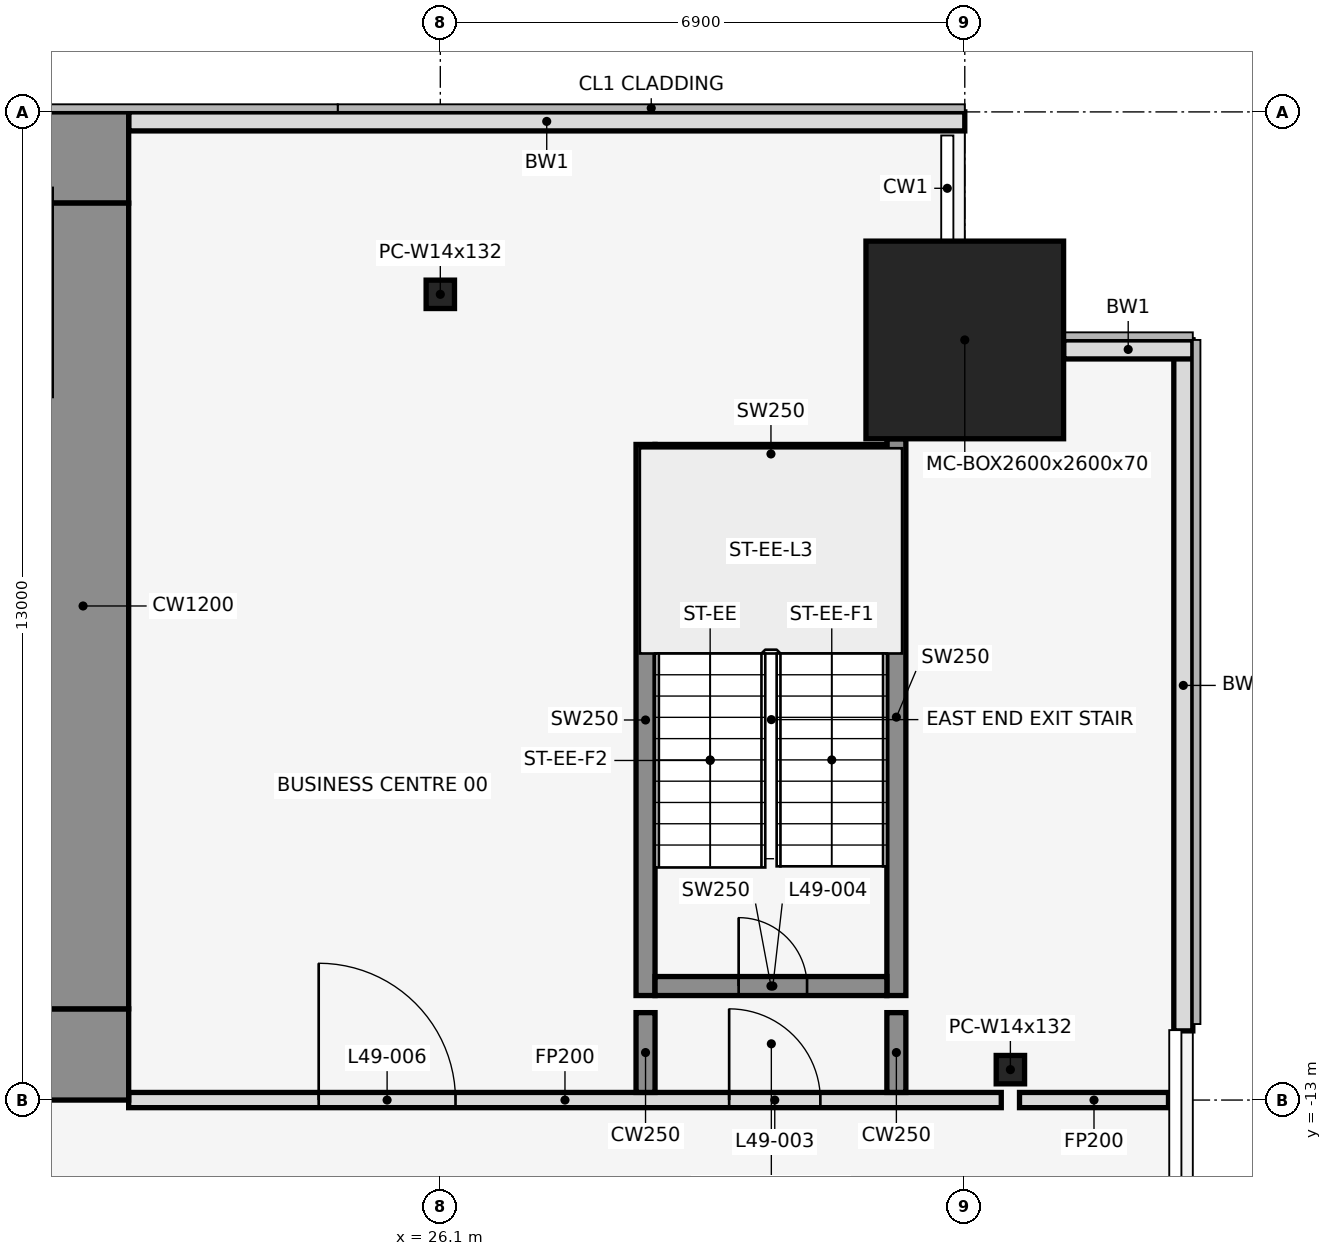
"""IFC4 building model, lengths in metres.
Left out: names, types, materials, properties, quantities, classifications, styles, units other than length and angle.
Written with IfcOpenShell. Run it as: python <this file> out.ifc"""

import sys

from ifc_helpers import new_model, si_unit, direction, frame, frame_2d, origin, origin_2d, place, context, subcontext, project, spatial, rectangle, hollow_rectangle, i_section, extrude, element, fill, save


model = new_model("IFC4")
c1 = context("Model", 3, precision=1e-05, world=origin(), true_north=direction((0.0, 1.0)))
c2 = subcontext(c1, "Body", "Model", "MODEL_VIEW")
j1 = project(units=[si_unit("LENGTHUNIT", "METRE"), si_unit("PLANEANGLEUNIT", "RADIAN")], contexts=[c1])
p1 = place(None, origin())
s1 = spatial("IfcSite", under=j1, at=p1, CompositionType="ELEMENT")
p2 = place(p1, origin())
s2 = spatial("IfcBuilding", under=s1, at=p2, CompositionType="ELEMENT")
p3 = place(p2, frame((0.0, 0.0, 219.6)))
s3 = spatial("IfcBuildingStorey", under=s2, at=p3, CompositionType="ELEMENT", Elevation=219.6)
p4 = place(p3, frame((26.1, -2.4, 0.0), z_axis=(0.0, 0.0, 1.0), x_axis=(1.0, 0.0, 0.0)))
e1 = element("IfcColumn", 1, at=p4, inside=s3, PredefinedType="COLUMN", context=c2, shape_type="SweptSolid", body=[
    extrude(i_section(OverallWidth=0.373, OverallDepth=0.373, WebThickness=0.016, FlangeThickness=0.026, at=origin_2d()), origin(), (0.0, 0.0, 1.0), 4.1),
])
p5 = place(p3, frame((33.0, -3.0, 0.0), z_axis=(0.0, 0.0, 1.0), x_axis=(1.0, 0.0, 0.0)))
e2 = element("IfcColumn", 2, at=p5, inside=s3, PredefinedType="COLUMN", context=c2, shape_type="SweptSolid", body=[
    extrude(hollow_rectangle(XDim=2.6, YDim=2.6, WallThickness=0.07, at=origin_2d()), origin(), (0.0, 0.0, 1.0), 4.1),
])
p6 = place(p3, frame((33.6, -12.6, 0.0), z_axis=(0.0, 0.0, 1.0), x_axis=(1.0, 0.0, 0.0)))
e3 = element("IfcColumn", 3, at=p6, inside=s3, PredefinedType="COLUMN", context=c2, shape_type="SweptSolid", body=[
    extrude(i_section(OverallWidth=0.373, OverallDepth=0.373, WebThickness=0.016, FlangeThickness=0.026, at=origin_2d()), origin(), (0.0, 0.0, 1.0), 4.1),
])
p7 = place(p3, frame((33.0, -0.125, 0.0), z_axis=(0.0, 0.0, 1.0), x_axis=(-1.0, 0.0, 0.0)))
e4 = element("IfcWall", 4, at=p7, inside=s3, PredefinedType="STANDARD", context=c2, shape_type="SweptSolid", body=[
    extrude(rectangle(XDim=11.0, YDim=0.25, at=frame_2d((5.5, 0.0))), origin(), (0.0, 0.0, 1.0), 3.95),
])
p8 = place(p3, frame((35.875, -12.09, 0.0), z_axis=(0.0, 0.0, 1.0), x_axis=(0.0, 1.0, 0.0)))
e5 = element("IfcWall", 5, at=p8, inside=s3, PredefinedType="STANDARD", context=c2, shape_type="SweptSolid", body=[
    extrude(rectangle(XDim=9.09, YDim=0.25, at=frame_2d((4.545, 0.0))), origin(), (0.0, 0.0, 1.0), 3.95),
])
p9 = place(p3, frame((36.0, -3.125, 0.0), z_axis=(0.0, 0.0, 1.0), x_axis=(-1.0, 0.0, 0.0)))
e6 = element("IfcWall", 6, at=p9, inside=s3, PredefinedType="STANDARD", context=c2, shape_type="SweptSolid", body=[
    extrude(rectangle(XDim=1.7, YDim=0.25, at=frame_2d((0.85, 0.0))), origin(), (0.0, 0.0, 1.0), 3.95),
])
p10 = place(p3, frame((28.8, -11.625, 0.0), z_axis=(0.0, 0.0, 1.0), x_axis=(0.0, 1.0, 0.0)))
e7 = element("IfcWall", 7, at=p10, inside=s3, PredefinedType="SHEAR", context=c2, shape_type="SweptSolid", body=[
    extrude(rectangle(XDim=7.25, YDim=0.25, at=frame_2d((3.625, 0.0))), origin(), (0.0, 0.0, 1.0), 4.1),
])
p11 = place(p3, frame((32.1, -11.625, 0.0), z_axis=(0.0, 0.0, 1.0), x_axis=(0.0, 1.0, 0.0)))
e8 = element("IfcWall", 8, at=p11, inside=s3, PredefinedType="SHEAR", context=c2, shape_type="SweptSolid", body=[
    extrude(rectangle(XDim=7.325, YDim=0.25, at=frame_2d((3.663, 0.0))), origin(), (0.0, 0.0, 1.0), 4.1),
])
p12 = place(p3, frame((28.925, -11.5, 0.0), z_axis=(0.0, 0.0, 1.0), x_axis=(1.0, 0.0, 0.0)))
e9 = element("IfcWall", 9, at=p12, inside=s3, PredefinedType="SHEAR", context=c2, shape_type="SweptSolid", body=[
    extrude(rectangle(XDim=3.05, YDim=0.25, at=frame_2d((1.525, 0.0))), origin(), (0.0, 0.0, 1.0), 4.1),
])
p13 = place(p12, frame((1.1, 0.0, 0.0)))
e10 = element("IfcOpeningElement", 10, at=p13, cuts=e9, PredefinedType="OPENING", context=c2, shape_type="SweptSolid", body=[
    extrude(rectangle(XDim=0.9, YDim=2.1, at=frame_2d((0.45, 1.05))), frame((0.0, 0.137, 0.0), z_axis=(0.0, -1.0, 0.0), x_axis=(1.0, 0.0, 0.0)), (0.0, 0.0, 1.0), 0.274),
])
p14 = place(p3, frame((28.925, -4.5, 0.0), z_axis=(0.0, 0.0, 1.0), x_axis=(1.0, 0.0, 0.0)))
e11 = element("IfcWall", 11, at=p14, inside=s3, PredefinedType="SHEAR", context=c2, shape_type="SweptSolid", body=[
    extrude(rectangle(XDim=3.05, YDim=0.25, at=frame_2d((1.525, 0.0))), origin(), (0.0, 0.0, 1.0), 4.1),
])
p15 = place(p3, frame((22.0, -13.0, 0.0), z_axis=(0.0, 0.0, 1.0), x_axis=(1.0, 0.0, 0.0)))
e12 = element("IfcWall", 12, at=p15, inside=s3, PredefinedType="PARTITIONING", context=c2, shape_type="SweptSolid", body=[
    extrude(rectangle(XDim=11.48, YDim=0.2, at=frame_2d((5.74, 0.0))), origin(), (0.0, 0.0, 1.0), 2.84),
])
p16 = place(p15, frame((7.9, 0.0, 0.0)))
e13 = element("IfcOpeningElement", 13, at=p16, cuts=e12, PredefinedType="OPENING", context=c2, shape_type="SweptSolid", body=[
    extrude(rectangle(XDim=1.2, YDim=2.1, at=frame_2d((0.6, 1.05))), frame((0.0, 0.112, 0.0), z_axis=(0.0, -1.0, 0.0), x_axis=(1.0, 0.0, 0.0)), (0.0, 0.0, 1.0), 0.224),
])
p17 = place(p15, frame((2.5, 0.0, 0.0)))
e14 = element("IfcOpeningElement", 14, at=p17, cuts=e12, PredefinedType="OPENING", context=c2, shape_type="SweptSolid", body=[
    extrude(rectangle(XDim=1.8, YDim=2.1, at=frame_2d((0.9, 1.05))), frame((0.0, 0.112, 0.0), z_axis=(0.0, -1.0, 0.0), x_axis=(1.0, 0.0, 0.0)), (0.0, 0.0, 1.0), 0.224),
])
p18 = place(p3, frame((33.72, -13.0, 0.0), z_axis=(0.0, 0.0, 1.0), x_axis=(1.0, 0.0, 0.0)))
e15 = element("IfcWall", 15, at=p18, inside=s3, PredefinedType="PARTITIONING", context=c2, shape_type="SweptSolid", body=[
    extrude(rectangle(XDim=1.96, YDim=0.2, at=frame_2d((0.98, 0.0))), origin(), (0.0, 0.0, 1.0), 2.84),
])
for number, where, z_axis, x_axis in (
    (16, (28.8, -12.9, 0.0), (0.0, 0.0, 1.0), (0.0, 1.0, 0.0)),
    (17, (32.1, -12.9, 0.0), (0.0, 0.0, 1.0), (0.0, 1.0, 0.0)),
):
    element("IfcWall", number, at=place(p3, frame(where, z_axis=z_axis, x_axis=x_axis)), inside=s3, PredefinedType="SHEAR", context=c2, shape_type="SweptSolid", body=[
        extrude(rectangle(XDim=1.05, YDim=0.25, at=frame_2d((0.525, 0.0))), origin(), (0.0, 0.0, 1.0), 4.1),
    ])
p19 = place(p3, frame((-22.0, -0.6, 0.0), z_axis=(0.0, 0.0, 1.0), x_axis=(1.0, 0.0, 0.0)))
e18 = element("IfcWall", 18, at=p19, inside=s3, PredefinedType="SHEAR", context=c2, shape_type="SweptSolid", body=[
    extrude(rectangle(XDim=44.0, YDim=1.2, at=frame_2d((22.0, 0.0))), origin(), (0.0, 0.0, 1.0), 4.1),
])
p20 = place(p19, frame((18.55, 0.0, 0.0)))
e19 = element("IfcOpeningElement", 19, at=p20, cuts=e18, PredefinedType="OPENING", context=c2, shape_type="SweptSolid", body=[
    extrude(rectangle(XDim=0.9, YDim=2.1, at=frame_2d((0.45, 1.05))), frame((0.0, 0.612, 0.0), z_axis=(0.0, -1.0, 0.0), x_axis=(1.0, 0.0, 0.0)), (0.0, 0.0, 1.0), 1.224),
])
p21 = place(p19, frame((24.55, 0.0, 0.0)))
e20 = element("IfcOpeningElement", 20, at=p21, cuts=e18, PredefinedType="OPENING", context=c2, shape_type="SweptSolid", body=[
    extrude(rectangle(XDim=0.9, YDim=2.1, at=frame_2d((0.45, 1.05))), frame((0.0, 0.612, 0.0), z_axis=(0.0, -1.0, 0.0), x_axis=(1.0, 0.0, 0.0)), (0.0, 0.0, 1.0), 1.224),
])
p22 = place(p3, frame((-22.0, -12.4, 0.0), z_axis=(0.0, 0.0, 1.0), x_axis=(1.0, 0.0, 0.0)))
e21 = element("IfcWall", 21, at=p22, inside=s3, PredefinedType="SHEAR", context=c2, shape_type="SweptSolid", body=[
    extrude(rectangle(XDim=44.0, YDim=1.2, at=frame_2d((22.0, 0.0))), origin(), (0.0, 0.0, 1.0), 4.1),
])
p23 = place(p22, frame((2.2, 0.0, 0.0)))
e22 = element("IfcOpeningElement", 22, at=p23, cuts=e21, PredefinedType="OPENING", context=c2, shape_type="SweptSolid", body=[
    extrude(rectangle(XDim=1.2, YDim=2.1, at=frame_2d((0.6, 1.05))), frame((0.0, 0.612, 0.0), z_axis=(0.0, -1.0, 0.0), x_axis=(1.0, 0.0, 0.0)), (0.0, 0.0, 1.0), 1.224),
])
p24 = place(p22, frame((21.4, 0.0, 0.0)))
e23 = element("IfcOpeningElement", 23, at=p24, cuts=e21, PredefinedType="OPENING", context=c2, shape_type="SweptSolid", body=[
    extrude(rectangle(XDim=1.2, YDim=2.1, at=frame_2d((0.6, 1.05))), frame((0.0, 0.612, 0.0), z_axis=(0.0, -1.0, 0.0), x_axis=(1.0, 0.0, 0.0)), (0.0, 0.0, 1.0), 1.224),
])
p25 = place(p22, frame((40.6, 0.0, 0.0)))
e24 = element("IfcOpeningElement", 24, at=p25, cuts=e21, PredefinedType="OPENING", context=c2, shape_type="SweptSolid", body=[
    extrude(rectangle(XDim=1.2, YDim=2.1, at=frame_2d((0.6, 1.05))), frame((0.0, 0.612, 0.0), z_axis=(0.0, -1.0, 0.0), x_axis=(1.0, 0.0, 0.0)), (0.0, 0.0, 1.0), 1.224),
])
p26 = place(p22, frame((16.0, 0.0, 0.0)))
e25 = element("IfcOpeningElement", 25, at=p26, cuts=e21, PredefinedType="OPENING", context=c2, shape_type="SweptSolid", body=[
    extrude(rectangle(XDim=1.8, YDim=2.1, at=frame_2d((0.9, 1.05))), frame((0.0, 0.612, 0.0), z_axis=(0.0, -1.0, 0.0), x_axis=(1.0, 0.0, 0.0)), (0.0, 0.0, 1.0), 1.224),
])
p27 = place(p22, frame((6.3, 0.0, 0.0)))
e26 = element("IfcOpeningElement", 26, at=p27, cuts=e21, PredefinedType="OPENING", context=c2, shape_type="SweptSolid", body=[
    extrude(rectangle(XDim=1.2, YDim=2.1, at=frame_2d((0.6, 1.05))), frame((0.0, 0.612, 0.0), z_axis=(0.0, -1.0, 0.0), x_axis=(1.0, 0.0, 0.0)), (0.0, 0.0, 1.0), 1.224),
])
p28 = place(p22, frame((26.2, 0.0, 0.0)))
e27 = element("IfcOpeningElement", 27, at=p28, cuts=e21, PredefinedType="OPENING", context=c2, shape_type="SweptSolid", body=[
    extrude(rectangle(XDim=1.8, YDim=2.1, at=frame_2d((0.9, 1.05))), frame((0.0, 0.612, 0.0), z_axis=(0.0, -1.0, 0.0), x_axis=(1.0, 0.0, 0.0)), (0.0, 0.0, 1.0), 1.224),
])
p29 = place(p22, frame((36.5, 0.0, 0.0)))
e28 = element("IfcOpeningElement", 28, at=p29, cuts=e21, PredefinedType="OPENING", context=c2, shape_type="SweptSolid", body=[
    extrude(rectangle(XDim=1.2, YDim=2.1, at=frame_2d((0.6, 1.05))), frame((0.0, 0.612, 0.0), z_axis=(0.0, -1.0, 0.0), x_axis=(1.0, 0.0, 0.0)), (0.0, 0.0, 1.0), 1.224),
])
p30 = place(p3, frame((21.4, -11.8, 0.0), z_axis=(0.0, 0.0, 1.0), x_axis=(0.0, 1.0, 0.0)))
e29 = element("IfcWall", 29, at=p30, inside=s3, PredefinedType="SHEAR", context=c2, shape_type="SweptSolid", body=[
    extrude(rectangle(XDim=10.6, YDim=1.2, at=frame_2d((5.3, 0.0))), origin(), (0.0, 0.0, 1.0), 4.1),
])
p31 = place(p16, origin())
e30 = element("IfcDoor", 30, at=p31, inside=s3, OperationType="SINGLE_SWING_RIGHT", PredefinedType="DOOR", context=c2, shape_type="SweptSolid", body=[
    extrude(rectangle(XDim=1.2, YDim=2.1, at=frame_2d((0.6, 1.05))), frame((0.0, 0.025, 0.0), z_axis=(0.0, -1.0, 0.0), x_axis=(1.0, 0.0, 0.0)), (0.0, 0.0, 1.0), 0.05),
])
fill(e13, e30)
p32 = place(p13, origin())
e31 = element("IfcDoor", 31, at=p32, inside=s3, OperationType="SINGLE_SWING_LEFT", PredefinedType="DOOR", context=c2, shape_type="SweptSolid", body=[
    extrude(rectangle(XDim=0.9, YDim=2.1, at=frame_2d((0.45, 1.05))), frame((0.0, 0.025, 0.0), z_axis=(0.0, -1.0, 0.0), x_axis=(1.0, 0.0, 0.0)), (0.0, 0.0, 1.0), 0.05),
])
fill(e10, e31)
p33 = place(p17, origin())
e32 = element("IfcDoor", 32, at=p33, inside=s3, OperationType="SINGLE_SWING_LEFT", PredefinedType="DOOR", context=c2, shape_type="SweptSolid", body=[
    extrude(rectangle(XDim=1.8, YDim=2.1, at=frame_2d((0.9, 1.05))), frame((0.0, 0.025, 0.0), z_axis=(0.0, -1.0, 0.0), x_axis=(1.0, 0.0, 0.0)), (0.0, 0.0, 1.0), 0.05),
])
fill(e14, e32)
save(model, sys.argv[1])
